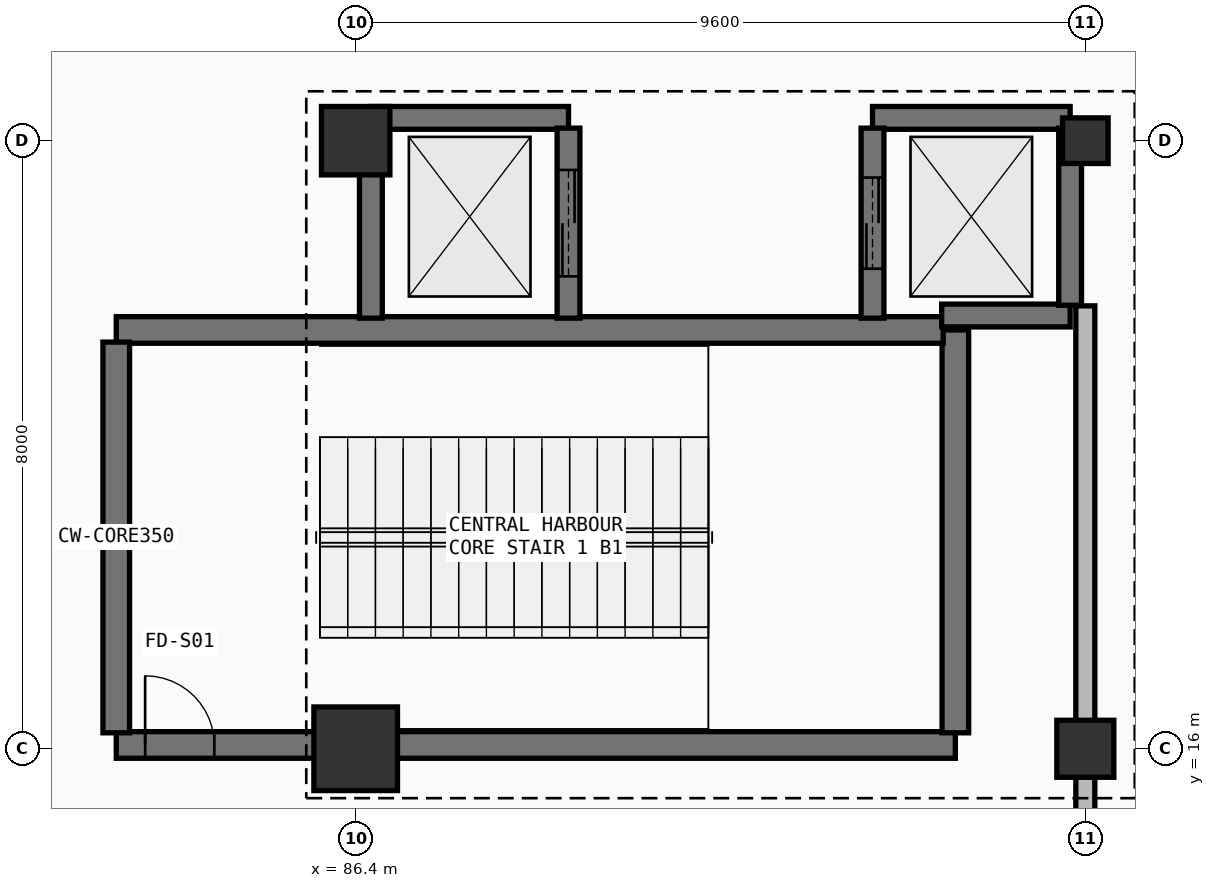
"""IFC4 building model, lengths in metres.
Left out: names, types, materials, properties, quantities, classifications, styles, units other than length and angle.
Written with IfcOpenShell. Run it as: python <this file> out.ifc"""

import sys

from ifc_helpers import new_model, si_unit, direction, frame, frame_2d, origin, origin_2d, place, context, subcontext, project, spatial, rectangle, extrude, element, fill, save


model = new_model("IFC4")
c1 = context("Model", 3, precision=1e-05, world=origin(), true_north=direction((0.0, 1.0)))
c2 = subcontext(c1, "Body", "Model", "MODEL_VIEW")
j1 = project(units=[si_unit("LENGTHUNIT", "METRE"), si_unit("PLANEANGLEUNIT", "RADIAN")], contexts=[c1])
p1 = place(None, origin())
s1 = spatial("IfcSite", under=j1, at=p1, CompositionType="ELEMENT")
p2 = place(p1, origin())
s2 = spatial("IfcBuilding", under=s1, at=p2, CompositionType="ELEMENT")
p3 = place(p2, frame((0.0, 0.0, -5.4)))
s3 = spatial("IfcBuildingStorey", under=s2, at=p3, CompositionType="ELEMENT", Elevation=-5.4)
p4 = place(p3, frame((86.4, 16.0, 0.0), z_axis=(0.0, 0.0, 1.0), x_axis=(1.0, 0.0, 0.0)))
e1 = element("IfcColumn", 1, at=p4, inside=s3, PredefinedType="COLUMN", context=c2, shape_type="SweptSolid", body=[
    extrude(rectangle(XDim=1.1, YDim=1.1, at=origin_2d()), origin(), (0.0, 0.0, 1.0), 5.4),
])
p5 = place(p3, frame((86.4, 24.0, 0.0), z_axis=(0.0, 0.0, 1.0), x_axis=(1.0, 0.0, 0.0)))
e2 = element("IfcColumn", 2, at=p5, inside=s3, PredefinedType="COLUMN", context=c2, shape_type="SweptSolid", body=[
    extrude(rectangle(XDim=0.9, YDim=0.9, at=origin_2d()), origin(), (0.0, 0.0, 1.0), 5.4),
])
p6 = place(p3, frame((96.0, 16.0, 0.0), z_axis=(0.0, 0.0, 1.0), x_axis=(1.0, 0.0, 0.0)))
e3 = element("IfcColumn", 3, at=p6, inside=s3, PredefinedType="COLUMN", context=c2, shape_type="SweptSolid", body=[
    extrude(rectangle(XDim=0.75, YDim=0.75, at=origin_2d()), origin(), (0.0, 0.0, 1.0), 5.4),
])
p7 = place(p3, frame((96.0, 24.0, 0.0), z_axis=(0.0, 0.0, 1.0), x_axis=(1.0, 0.0, 0.0)))
e4 = element("IfcColumn", 4, at=p7, inside=s3, PredefinedType="COLUMN", context=c2, shape_type="SweptSolid", body=[
    extrude(rectangle(XDim=0.6, YDim=0.6, at=origin_2d()), origin(), (0.0, 0.0, 1.0), 5.4),
])
p8 = place(p3, frame((83.25, 16.05, 0.0), z_axis=(0.0, 0.0, 1.0), x_axis=(1.0, 0.0, 0.0)))
e5 = element("IfcWall", 5, at=p8, inside=s3, PredefinedType="SHEAR", context=c2, shape_type="SweptSolid", body=[
    extrude(rectangle(XDim=11.04, YDim=0.35, at=frame_2d((5.52, 0.0))), origin(), (0.0, 0.0, 1.0), 5.09),
])
p9 = place(p8, frame((0.38, 0.0, 0.0)))
e6 = element("IfcOpeningElement", 6, at=p9, cuts=e5, PredefinedType="OPENING", context=c2, shape_type="SweptSolid", body=[
    extrude(rectangle(XDim=0.91, YDim=2.08, at=frame_2d((0.455, 1.04))), frame((0.0, 0.185, 0.0), z_axis=(0.0, -1.0, 0.0), x_axis=(1.0, 0.0, 0.0)), (0.0, 0.0, 1.0), 0.37),
])
p10 = place(p3, frame((94.29, 16.21, 0.0), z_axis=(0.0, 0.0, 1.0), x_axis=(0.0, 1.0, 0.0)))
e7 = element("IfcWall", 7, at=p10, inside=s3, PredefinedType="SHEAR", context=c2, shape_type="SweptSolid", body=[
    extrude(rectangle(XDim=5.3, YDim=0.35, at=frame_2d((2.65, 0.0))), origin(), (0.0, 0.0, 1.0), 5.09),
])
p11 = place(p3, frame((94.13, 21.51, 0.0), z_axis=(0.0, 0.0, 1.0), x_axis=(-1.0, 0.0, 0.0)))
e8 = element("IfcWall", 8, at=p11, inside=s3, PredefinedType="SHEAR", context=c2, shape_type="SweptSolid", body=[
    extrude(rectangle(XDim=10.88, YDim=0.35, at=frame_2d((5.44, 0.0))), origin(), (0.0, 0.0, 1.0), 5.09),
])
p12 = place(p3, frame((83.25, 21.35, 0.0), z_axis=(0.0, 0.0, 1.0), x_axis=(0.0, -1.0, 0.0)))
e9 = element("IfcWall", 9, at=p12, inside=s3, PredefinedType="SHEAR", context=c2, shape_type="SweptSolid", body=[
    extrude(rectangle(XDim=5.14, YDim=0.35, at=frame_2d((2.57, 0.0))), origin(), (0.0, 0.0, 1.0), 5.09),
])
p13 = place(p3, frame((89.2, 24.3, 0.0), z_axis=(0.0, 0.0, 1.0), x_axis=(-1.0, 0.0, 0.0)))
e10 = element("IfcWall", 10, at=p13, inside=s3, PredefinedType="SHEAR", context=c2, shape_type="SweptSolid", body=[
    extrude(rectangle(XDim=2.6, YDim=0.3, at=frame_2d((1.3, 0.0))), origin(), (0.0, 0.0, 1.0), 5.09),
])
p14 = place(p3, frame((89.2, 21.665, 0.0), z_axis=(0.0, 0.0, 1.0), x_axis=(0.0, 1.0, 0.0)))
e11 = element("IfcWall", 11, at=p14, inside=s3, PredefinedType="SHEAR", context=c2, shape_type="SweptSolid", body=[
    extrude(rectangle(XDim=2.5, YDim=0.3, at=frame_2d((1.25, 0.0))), origin(), (0.0, 0.0, 1.0), 5.09),
])
p15 = place(p14, frame((0.55, 0.0, 0.0)))
e12 = element("IfcOpeningElement", 12, at=p15, cuts=e11, PredefinedType="OPENING", context=c2, shape_type="SweptSolid", body=[
    extrude(rectangle(XDim=1.4, YDim=2.26, at=frame_2d((0.7, 1.13))), frame((0.0, 0.16, 0.0), z_axis=(0.0, -1.0, 0.0), x_axis=(1.0, 0.0, 0.0)), (0.0, 0.0, 1.0), 0.32),
])
p16 = place(p3, frame((86.6, 24.165, 0.0), z_axis=(0.0, 0.0, 1.0), x_axis=(0.0, -1.0, 0.0)))
e13 = element("IfcWall", 13, at=p16, inside=s3, PredefinedType="SHEAR", context=c2, shape_type="SweptSolid", body=[
    extrude(rectangle(XDim=2.5, YDim=0.3, at=frame_2d((1.25, 0.0))), origin(), (0.0, 0.0, 1.0), 5.09),
])
p17 = place(p3, frame((95.8, 24.3, 0.0), z_axis=(0.0, 0.0, 1.0), x_axis=(-1.0, 0.0, 0.0)))
e14 = element("IfcWall", 14, at=p17, inside=s3, PredefinedType="SHEAR", context=c2, shape_type="SweptSolid", body=[
    extrude(rectangle(XDim=2.6, YDim=0.3, at=frame_2d((1.3, 0.0))), origin(), (0.0, 0.0, 1.0), 5.09),
])
p18 = place(p3, frame((94.11, 21.7, 0.0), z_axis=(0.0, 0.0, 1.0), x_axis=(1.0, 0.0, 0.0)))
e15 = element("IfcWall", 15, at=p18, inside=s3, PredefinedType="SHEAR", context=c2, shape_type="SweptSolid", body=[
    extrude(rectangle(XDim=1.69, YDim=0.3, at=frame_2d((0.845, 0.0))), origin(), (0.0, 0.0, 1.0), 5.09),
])
p19 = place(p3, frame((95.8, 21.835, 0.0), z_axis=(0.0, 0.0, 1.0), x_axis=(0.0, 1.0, 0.0)))
e16 = element("IfcWall", 16, at=p19, inside=s3, PredefinedType="SHEAR", context=c2, shape_type="SweptSolid", body=[
    extrude(rectangle(XDim=2.33, YDim=0.3, at=frame_2d((1.165, 0.0))), origin(), (0.0, 0.0, 1.0), 5.09),
])
p20 = place(p3, frame((93.2, 24.165, 0.0), z_axis=(0.0, 0.0, 1.0), x_axis=(0.0, -1.0, 0.0)))
e17 = element("IfcWall", 17, at=p20, inside=s3, PredefinedType="SHEAR", context=c2, shape_type="SweptSolid", body=[
    extrude(rectangle(XDim=2.5, YDim=0.3, at=frame_2d((1.25, 0.0))), origin(), (0.0, 0.0, 1.0), 5.09),
])
p21 = place(p20, frame((0.65, 0.0, 0.0)))
e18 = element("IfcOpeningElement", 18, at=p21, cuts=e17, PredefinedType="OPENING", context=c2, shape_type="SweptSolid", body=[
    extrude(rectangle(XDim=1.2, YDim=2.2, at=frame_2d((0.6, 1.1))), frame((0.0, 0.16, 0.0), z_axis=(0.0, -1.0, 0.0), x_axis=(1.0, 0.0, 0.0)), (0.0, 0.0, 1.0), 0.32),
])
p22 = place(p3, frame((96.0, 8.494, 0.0), z_axis=(0.0, 0.0, 1.0), x_axis=(0.0, 1.0, 0.0)))
e19 = element("IfcWall", 19, at=p22, inside=s3, PredefinedType="SOLIDWALL", context=c2, shape_type="SweptSolid", body=[
    extrude(rectangle(XDim=13.333, YDim=0.25, at=frame_2d((6.667, 0.0))), origin(), (0.0, 0.0, 1.0), 4.16),
])
p23 = place(p22, frame((3.22, 0.0, 0.0)))
e20 = element("IfcOpeningElement", 20, at=p23, cuts=e19, PredefinedType="OPENING", context=c2, shape_type="SweptSolid", body=[
    extrude(rectangle(XDim=2.6, YDim=2.5, at=frame_2d((1.3, 1.25))), frame((0.0, 0.135, 0.0), z_axis=(0.0, -1.0, 0.0), x_axis=(1.0, 0.0, 0.0)), (0.0, 0.0, 1.0), 0.27),
])
p24 = place(p9, origin())
e21 = element("IfcDoor", 21, at=p24, inside=s3, OperationType="SINGLE_SWING_LEFT", PredefinedType="DOOR", context=c2, shape_type="SweptSolid", body=[
    extrude(rectangle(XDim=0.91, YDim=2.08, at=frame_2d((0.455, 1.04))), frame((0.0, 0.025, 0.0), z_axis=(0.0, -1.0, 0.0), x_axis=(1.0, 0.0, 0.0)), (0.0, 0.0, 1.0), 0.05),
])
fill(e6, e21)
p25 = place(p15, origin())
e22 = element("IfcDoor", 22, at=p25, inside=s3, OperationType="DOUBLE_DOOR_SLIDING", PredefinedType="DOOR", context=c2, shape_type="SweptSolid", body=[
    extrude(rectangle(XDim=1.4, YDim=2.26, at=frame_2d((0.7, 1.13))), frame((0.0, 0.025, 0.0), z_axis=(0.0, -1.0, 0.0), x_axis=(1.0, 0.0, 0.0)), (0.0, 0.0, 1.0), 0.05),
])
fill(e12, e22)
p26 = place(p21, origin())
e23 = element("IfcDoor", 23, at=p26, inside=s3, OperationType="DOUBLE_DOOR_SLIDING", PredefinedType="DOOR", context=c2, shape_type="SweptSolid", body=[
    extrude(rectangle(XDim=1.2, YDim=2.2, at=frame_2d((0.6, 1.1))), frame((0.0, 0.025, 0.0), z_axis=(0.0, -1.0, 0.0), x_axis=(1.0, 0.0, 0.0)), (0.0, 0.0, 1.0), 0.05),
])
fill(e18, e23)
save(model, sys.argv[1])
